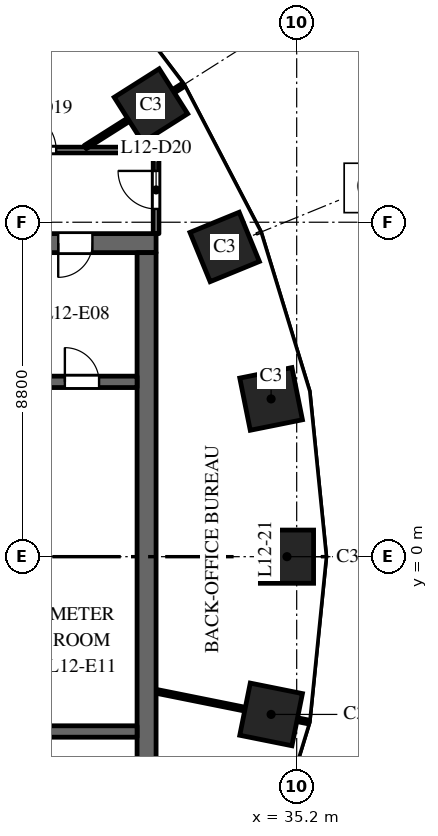
"""IFC4 building model, lengths in metres.
Left out: names, types, materials, properties, quantities, classifications, styles, units other than length and angle.
Written with IfcOpenShell. Run it as: python <this file> out.ifc"""

import sys

from ifc_helpers import new_model, si_unit, direction, frame, frame_2d, origin, origin_2d, place, context, subcontext, project, spatial, rectangle, extrude, element, fill, save


model = new_model("IFC4")
c1 = context("Model", 3, precision=1e-05, world=origin(), true_north=direction((0.0, 1.0)))
c2 = subcontext(c1, "Body", "Model", "MODEL_VIEW")
j1 = project(units=[si_unit("LENGTHUNIT", "METRE"), si_unit("PLANEANGLEUNIT", "RADIAN")], contexts=[c1])
p1 = place(None, origin())
s1 = spatial("IfcSite", under=j1, at=p1, CompositionType="ELEMENT")
p2 = place(p1, origin())
s2 = spatial("IfcBuilding", under=s1, at=p2, CompositionType="ELEMENT")
p3 = place(p2, frame((0.0, 0.0, 58.5)))
s3 = spatial("IfcBuildingStorey", under=s2, at=p3, CompositionType="ELEMENT", Elevation=58.5)
for number, where, z_axis, x_axis in (
    (1, (34.945, 0.0, 0.0), (0.0, 0.0, 1.0), (0.0, 1.0, 0.0)),
    (2, (34.527, 4.151, 0.0), (0.0, 0.0, 1.0), (-0.197, 0.98, 0.0)),
    (3, (33.305, 8.149, 0.0), (0.0, 0.0, 1.0), (-0.379, 0.925, 0.0)),
    (4, (31.365, 11.871, 0.0), (0.0, 0.0, 1.0), (-0.535, 0.845, 0.0)),
    (5, (34.527, -4.151, 0.0), (0.0, 0.0, 1.0), (0.197, 0.98, 0.0)),
):
    element("IfcColumn", number, at=place(p3, frame(where, z_axis=z_axis, x_axis=x_axis)), inside=s3, PredefinedType="COLUMN", context=c2, shape_type="SweptSolid", body=[
        extrude(rectangle(XDim=1.4, YDim=1.4, at=origin_2d()), origin(), (0.0, 0.0, 1.0), 4.0),
    ])
p4 = place(p3, frame((16.5, 8.25, 0.0), z_axis=(0.0, 0.0, 1.0), x_axis=(1.0, 0.0, 0.0)))
e6 = element("IfcWall", 6, at=p4, inside=s3, PredefinedType="SHEAR", context=c2, shape_type="SweptSolid", body=[
    extrude(rectangle(XDim=15.0, YDim=0.5, at=frame_2d((7.5, 0.0))), origin(), (0.0, 0.0, 1.0), 3.7),
])
p5 = place(p4, frame((6.9, 0.0, 0.0)))
e7 = element("IfcOpeningElement", 7, at=p5, cuts=e6, PredefinedType="OPENING", context=c2, shape_type="SweptSolid", body=[
    extrude(rectangle(XDim=1.2, YDim=2.1, at=frame_2d((0.6, 1.05))), frame((0.0, 0.26, 0.0), z_axis=(0.0, -1.0, 0.0), x_axis=(1.0, 0.0, 0.0)), (0.0, 0.0, 1.0), 0.52),
])
p6 = place(p4, frame((12.425, 0.0, 0.0)))
e8 = element("IfcOpeningElement", 8, at=p6, cuts=e6, PredefinedType="OPENING", context=c2, shape_type="SweptSolid", body=[
    extrude(rectangle(XDim=0.9, YDim=2.1, at=frame_2d((0.45, 1.05))), frame((0.0, 0.26, 0.0), z_axis=(0.0, -1.0, 0.0), x_axis=(1.0, 0.0, 0.0)), (0.0, 0.0, 1.0), 0.52),
])
p7 = place(p3, frame((31.25, -8.0, 0.0), z_axis=(0.0, 0.0, 1.0), x_axis=(0.0, 1.0, 0.0)))
e9 = element("IfcWall", 9, at=p7, inside=s3, PredefinedType="SHEAR", context=c2, shape_type="SweptSolid", body=[
    extrude(rectangle(XDim=16.0, YDim=0.5, at=frame_2d((8.0, 0.0))), origin(), (0.0, 0.0, 1.0), 3.7),
])
p8 = place(p3, frame((24.9, 4.6, 0.0), z_axis=(0.0, 0.0, 1.0), x_axis=(1.0, 0.0, 0.0)))
e10 = element("IfcWall", 10, at=p8, inside=s3, PredefinedType="SHEAR", context=c2, shape_type="SweptSolid", body=[
    extrude(rectangle(XDim=6.1, YDim=0.3, at=frame_2d((3.05, 0.0))), origin(), (0.0, 0.0, 1.0), 3.7),
])
p9 = place(p8, frame((4.2, 0.0, 0.0)))
e11 = element("IfcOpeningElement", 11, at=p9, cuts=e10, PredefinedType="OPENING", context=c2, shape_type="SweptSolid", body=[
    extrude(rectangle(XDim=0.9, YDim=2.1, at=frame_2d((0.45, 1.05))), frame((0.0, 0.16, 0.0), z_axis=(0.0, -1.0, 0.0), x_axis=(1.0, 0.0, 0.0)), (0.0, 0.0, 1.0), 0.32),
])
p10 = place(p3, frame((24.9, -4.6, 0.0), z_axis=(0.0, 0.0, 1.0), x_axis=(1.0, 0.0, 0.0)))
e12 = element("IfcWall", 12, at=p10, inside=s3, PredefinedType="SHEAR", context=c2, shape_type="SweptSolid", body=[
    extrude(rectangle(XDim=6.1, YDim=0.3, at=frame_2d((3.05, 0.0))), origin(), (0.0, 0.0, 1.0), 3.7),
])
p11 = place(p3, frame((16.5, 10.7, 0.0), z_axis=(0.0, 0.0, 1.0), x_axis=(1.0, 0.0, 0.0)))
e13 = element("IfcWall", 13, at=p11, inside=s3, PredefinedType="PARTITIONING", context=c2, shape_type="SweptSolid", body=[
    extrude(rectangle(XDim=15.0, YDim=0.15, at=frame_2d((7.5, 0.0))), origin(), (0.0, 0.0, 1.0), 2.75),
])
p12 = place(p11, frame((11.371, 0.0, 0.0)))
e14 = element("IfcOpeningElement", 14, at=p12, cuts=e13, PredefinedType="OPENING", context=c2, shape_type="SweptSolid", body=[
    extrude(rectangle(XDim=1.0, YDim=2.1, at=frame_2d((0.5, 1.05))), frame((0.0, 0.085, 0.0), z_axis=(0.0, -1.0, 0.0), x_axis=(1.0, 0.0, 0.0)), (0.0, 0.0, 1.0), 0.17),
])
p13 = place(p3, frame((29.637, 10.777, 0.0), z_axis=(0.0, 0.0, 1.0), x_axis=(0.844810627195, 0.535065420467, 0.0)))
e15 = element("IfcWall", 15, at=p13, inside=s3, PredefinedType="PARTITIONING", context=c2, shape_type="SweptSolid", body=[
    extrude(rectangle(XDim=3.048, YDim=0.1, at=frame_2d((1.524, 0.0))), origin(), (0.0, 0.0, 1.0), 2.85),
])
p14 = place(p3, frame((31.5, -3.542, 0.0), z_axis=(0.0, 0.0, 1.0), x_axis=(0.980357474535, -0.197228857227, 0.0)))
e16 = element("IfcWall", 16, at=p14, inside=s3, PredefinedType="PARTITIONING", context=c2, shape_type="SweptSolid", body=[
    extrude(rectangle(XDim=4.092, YDim=0.1, at=frame_2d((2.046, 0.0))), origin(), (0.0, 0.0, 1.0), 2.85),
])
p15 = place(p3, frame((31.5, 8.5, 0.0), z_axis=(0.0, 0.0, 1.0), x_axis=(0.0, 1.0, 0.0)))
e17 = element("IfcWall", 17, at=p15, inside=s3, PredefinedType="PARTITIONING", context=c2, shape_type="SweptSolid", body=[
    extrude(rectangle(XDim=2.2, YDim=0.15, at=frame_2d((1.1, 0.0))), origin(), (0.0, 0.0, 1.0), 2.85),
])
p16 = place(p15, frame((0.65, 0.0, 0.0)))
e18 = element("IfcOpeningElement", 18, at=p16, cuts=e17, PredefinedType="OPENING", context=c2, shape_type="SweptSolid", body=[
    extrude(rectangle(XDim=1.0, YDim=2.1, at=frame_2d((0.5, 1.05))), frame((0.0, 0.085, 0.0), z_axis=(0.0, -1.0, 0.0), x_axis=(1.0, 0.0, 0.0)), (0.0, 0.0, 1.0), 0.17),
])
p17 = place(p6, origin())
e19 = element("IfcDoor", 19, at=p17, inside=s3, OperationType="SINGLE_SWING_LEFT", PredefinedType="DOOR", context=c2, shape_type="SweptSolid", body=[
    extrude(rectangle(XDim=0.9, YDim=2.1, at=frame_2d((0.45, 1.05))), frame((0.0, 0.025, 0.0), z_axis=(0.0, -1.0, 0.0), x_axis=(1.0, 0.0, 0.0)), (0.0, 0.0, 1.0), 0.05),
])
fill(e8, e19)
p18 = place(p9, origin())
e20 = element("IfcDoor", 20, at=p18, inside=s3, OperationType="SINGLE_SWING_RIGHT", PredefinedType="DOOR", context=c2, shape_type="SweptSolid", body=[
    extrude(rectangle(XDim=0.9, YDim=2.1, at=frame_2d((0.45, 1.05))), frame((0.0, 0.025, 0.0), z_axis=(0.0, -1.0, 0.0), x_axis=(1.0, 0.0, 0.0)), (0.0, 0.0, 1.0), 0.05),
])
fill(e11, e20)
p19 = place(p12, origin())
e21 = element("IfcDoor", 21, at=p19, inside=s3, OperationType="SINGLE_SWING_LEFT", PredefinedType="DOOR", context=c2, shape_type="SweptSolid", body=[
    extrude(rectangle(XDim=1.0, YDim=2.1, at=frame_2d((0.5, 1.05))), frame((0.0, 0.025, 0.0), z_axis=(0.0, -1.0, 0.0), x_axis=(1.0, 0.0, 0.0)), (0.0, 0.0, 1.0), 0.05),
])
fill(e14, e21)
p20 = place(p16, origin())
e22 = element("IfcDoor", 22, at=p20, inside=s3, OperationType="SINGLE_SWING_RIGHT", PredefinedType="DOOR", context=c2, shape_type="SweptSolid", body=[
    extrude(rectangle(XDim=1.0, YDim=2.1, at=frame_2d((0.5, 1.05))), frame((0.0, 0.025, 0.0), z_axis=(0.0, -1.0, 0.0), x_axis=(1.0, 0.0, 0.0)), (0.0, 0.0, 1.0), 0.05),
])
fill(e18, e22)
save(model, sys.argv[1])
